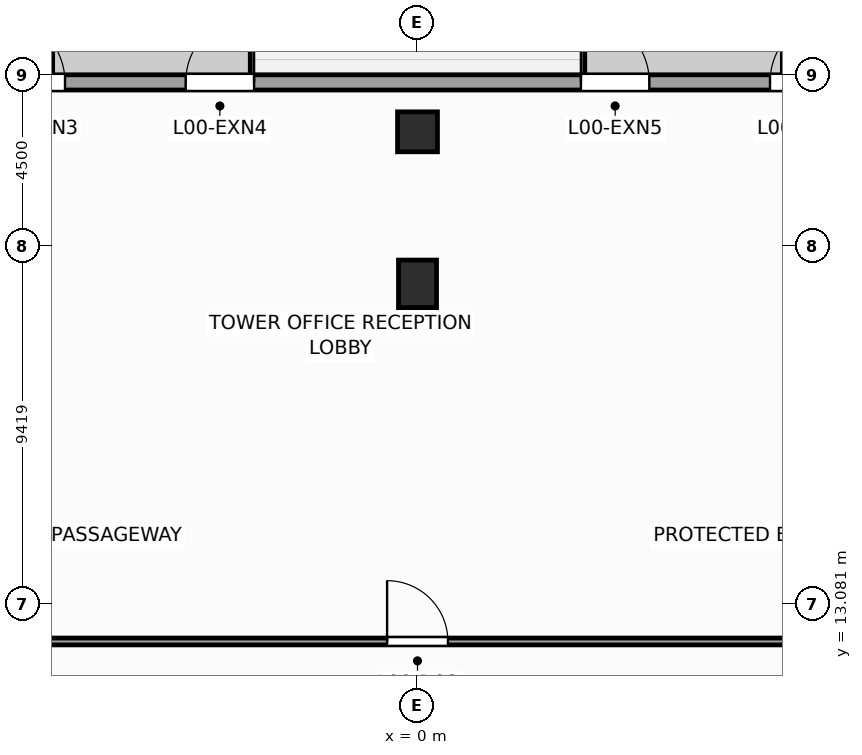
"""IFC4 building model, lengths in metres.
Left out: names, types, materials, properties, quantities, classifications, styles, units other than length and angle.
Written with IfcOpenShell. Run it as: python <this file> out.ifc"""

import sys

from ifc_helpers import new_model, si_unit, direction, frame, frame_2d, origin, origin_2d, place, context, subcontext, project, spatial, rectangle, extrude, source, transform, mapped, element, fill, save


model = new_model("IFC4")
c1 = context("Model", 3, precision=1e-05, world=origin(), true_north=direction((0.0, 1.0)))
c2 = subcontext(c1, "Body", "Model", "MODEL_VIEW")
j1 = project(units=[si_unit("LENGTHUNIT", "METRE"), si_unit("PLANEANGLEUNIT", "RADIAN")], contexts=[c1])
p1 = place(None, origin())
s1 = spatial("IfcSite", under=j1, at=p1, CompositionType="ELEMENT")
p2 = place(p1, origin())
s2 = spatial("IfcBuilding", under=s1, at=p2, CompositionType="ELEMENT")
p3 = place(p2, origin())
s3 = spatial("IfcBuildingStorey", under=s2, at=p3, CompositionType="ELEMENT", Elevation=0.0)
m1 = source(origin(), c2, "Body", "SweptSolid", [
    extrude(rectangle(XDim=1.0, YDim=1.25, at=origin_2d()), origin(), (0.0, 0.0, 1.0), 6.0),
])
p4 = place(p3, frame((0.0, 21.5, 0.0), z_axis=(0.0, 0.0, 1.0), x_axis=(1.0, 0.0, 0.0)))
e1 = element("IfcColumn", 1, at=p4, inside=s3, PredefinedType="COLUMN", context=c2, shape_type="MappedRepresentation", body=[
    mapped(m1, transform((0.0, 0.0, 0.0), scale=1.0)),
])
m2 = source(origin(), c2, "Body", "SweptSolid", [
    extrude(rectangle(XDim=1.05, YDim=1.05, at=origin_2d()), origin(), (0.0, 0.0, 1.0), 6.0),
])
p5 = place(p3, frame((0.0, 25.5, 0.0), z_axis=(0.0, 0.0, 1.0), x_axis=(1.0, 0.0, 0.0)))
e2 = element("IfcColumn", 2, at=p5, inside=s3, PredefinedType="COLUMN", context=c2, shape_type="MappedRepresentation", body=[
    mapped(m2, transform((0.0, 0.0, 0.0), scale=1.0)),
])
p6 = place(p3, frame((-30.0, 26.8, 0.0), z_axis=(0.0, 0.0, 1.0), x_axis=(1.0, 0.0, 0.0)))
e3 = element("IfcWall", 3, at=p6, inside=s3, PredefinedType="STANDARD", context=c2, shape_type="SweptSolid", body=[
    extrude(rectangle(XDim=50.0, YDim=0.4, at=frame_2d((25.0, 0.0))), origin(), (0.0, 0.0, 1.0), 5.66),
])
p7 = place(p6, frame((9.6, 0.0, 0.0)))
e4 = element("IfcOpeningElement", 4, at=p7, cuts=e3, PredefinedType="OPENING", context=c2, shape_type="SweptSolid", body=[
    extrude(rectangle(XDim=1.8, YDim=2.4, at=frame_2d((0.9, 1.2))), frame((0.0, 0.21, 0.0), z_axis=(0.0, -1.0, 0.0), x_axis=(1.0, 0.0, 0.0)), (0.0, 0.0, 1.0), 0.42),
])
p8 = place(p6, frame((14.3, 0.0, 0.0)))
e5 = element("IfcOpeningElement", 5, at=p8, cuts=e3, PredefinedType="OPENING", context=c2, shape_type="SweptSolid", body=[
    extrude(rectangle(XDim=1.8, YDim=2.4, at=frame_2d((0.9, 1.2))), frame((0.0, 0.21, 0.0), z_axis=(0.0, -1.0, 0.0), x_axis=(1.0, 0.0, 0.0)), (0.0, 0.0, 1.0), 0.42),
])
p9 = place(p6, frame((18.925, 0.0, 0.0)))
e6 = element("IfcOpeningElement", 6, at=p9, cuts=e3, PredefinedType="OPENING", context=c2, shape_type="SweptSolid", body=[
    extrude(rectangle(XDim=1.8, YDim=2.4, at=frame_2d((0.9, 1.2))), frame((0.0, 0.21, 0.0), z_axis=(0.0, -1.0, 0.0), x_axis=(1.0, 0.0, 0.0)), (0.0, 0.0, 1.0), 0.42),
])
p10 = place(p6, frame((23.9, 0.0, 0.0)))
e7 = element("IfcOpeningElement", 7, at=p10, cuts=e3, PredefinedType="OPENING", context=c2, shape_type="SweptSolid", body=[
    extrude(rectangle(XDim=1.8, YDim=2.4, at=frame_2d((0.9, 1.2))), frame((0.0, 0.21, 0.0), z_axis=(0.0, -1.0, 0.0), x_axis=(1.0, 0.0, 0.0)), (0.0, 0.0, 1.0), 0.42),
])
p11 = place(p6, frame((34.3, 0.0, 0.0)))
e8 = element("IfcOpeningElement", 8, at=p11, cuts=e3, PredefinedType="OPENING", context=c2, shape_type="SweptSolid", body=[
    extrude(rectangle(XDim=1.8, YDim=2.4, at=frame_2d((0.9, 1.2))), frame((0.0, 0.21, 0.0), z_axis=(0.0, -1.0, 0.0), x_axis=(1.0, 0.0, 0.0)), (0.0, 0.0, 1.0), 0.42),
])
p12 = place(p6, frame((39.275, 0.0, 0.0)))
e9 = element("IfcOpeningElement", 9, at=p12, cuts=e3, PredefinedType="OPENING", context=c2, shape_type="SweptSolid", body=[
    extrude(rectangle(XDim=1.8, YDim=2.4, at=frame_2d((0.9, 1.2))), frame((0.0, 0.21, 0.0), z_axis=(0.0, -1.0, 0.0), x_axis=(1.0, 0.0, 0.0)), (0.0, 0.0, 1.0), 0.42),
])
p13 = place(p6, frame((46.6, 0.0, 0.0)))
e10 = element("IfcOpeningElement", 10, at=p13, cuts=e3, PredefinedType="OPENING", context=c2, shape_type="SweptSolid", body=[
    extrude(rectangle(XDim=1.8, YDim=2.4, at=frame_2d((0.9, 1.2))), frame((0.0, 0.21, 0.0), z_axis=(0.0, -1.0, 0.0), x_axis=(1.0, 0.0, 0.0)), (0.0, 0.0, 1.0), 0.42),
])
p14 = place(p3, frame((-14.5, 12.09, 0.0), z_axis=(0.0, 0.0, 1.0), x_axis=(1.0, 0.0, 0.0)))
e11 = element("IfcWall", 11, at=p14, inside=s3, PredefinedType="PARTITIONING", context=c2, shape_type="SweptSolid", body=[
    extrude(rectangle(XDim=29.0, YDim=0.18, at=frame_2d((14.5, 0.0))), origin(), (0.0, 0.0, 1.0), 5.66),
])
p15 = place(p14, frame((13.7, 0.0, 0.0)))
e12 = element("IfcOpeningElement", 12, at=p15, cuts=e11, PredefinedType="OPENING", context=c2, shape_type="SweptSolid", body=[
    extrude(rectangle(XDim=1.6, YDim=2.5, at=frame_2d((0.8, 1.25))), frame((0.0, 0.1, 0.0), z_axis=(0.0, -1.0, 0.0), x_axis=(1.0, 0.0, 0.0)), (0.0, 0.0, 1.0), 0.2),
])
m3 = source(origin(), c2, "Body", "SweptSolid", [
    extrude(rectangle(XDim=1.8, YDim=2.4, at=frame_2d((0.9, 1.2))), frame((0.0, 0.025, 0.0), z_axis=(0.0, -1.0, 0.0), x_axis=(1.0, 0.0, 0.0)), (0.0, 0.0, 1.0), 0.05),
])
p16 = place(p9, origin())
e13 = element("IfcDoor", 13, at=p16, inside=s3, OperationType="SINGLE_SWING_LEFT", PredefinedType="DOOR", context=c2, shape_type="MappedRepresentation", body=[
    mapped(m3, transform((0.0, 0.0, 0.0), scale=1.0)),
])
fill(e6, e13)
p17 = place(p10, origin())
e14 = element("IfcDoor", 14, at=p17, inside=s3, OperationType="SINGLE_SWING_RIGHT", PredefinedType="DOOR", context=c2, shape_type="MappedRepresentation", body=[
    mapped(m3, transform((0.0, 0.0, 0.0), scale=1.0)),
])
fill(e7, e14)
p18 = place(p11, origin())
e15 = element("IfcDoor", 15, at=p18, inside=s3, OperationType="SINGLE_SWING_LEFT", PredefinedType="DOOR", context=c2, shape_type="MappedRepresentation", body=[
    mapped(m3, transform((0.0, 0.0, 0.0), scale=1.0)),
])
fill(e8, e15)
p19 = place(p12, origin())
e16 = element("IfcDoor", 16, at=p19, inside=s3, OperationType="SINGLE_SWING_RIGHT", PredefinedType="DOOR", context=c2, shape_type="MappedRepresentation", body=[
    mapped(m3, transform((0.0, 0.0, 0.0), scale=1.0)),
])
fill(e9, e16)
m4 = source(origin(), c2, "Body", "SweptSolid", [
    extrude(rectangle(XDim=1.6, YDim=2.5, at=frame_2d((0.8, 1.25))), frame((0.0, 0.025, 0.0), z_axis=(0.0, -1.0, 0.0), x_axis=(1.0, 0.0, 0.0)), (0.0, 0.0, 1.0), 0.05),
])
p20 = place(p15, origin())
e17 = element("IfcDoor", 17, at=p20, inside=s3, OperationType="SINGLE_SWING_LEFT", PredefinedType="DOOR", context=c2, shape_type="MappedRepresentation", body=[
    mapped(m4, transform((0.0, 0.0, 0.0), scale=1.0)),
])
fill(e12, e17)
save(model, sys.argv[1])
